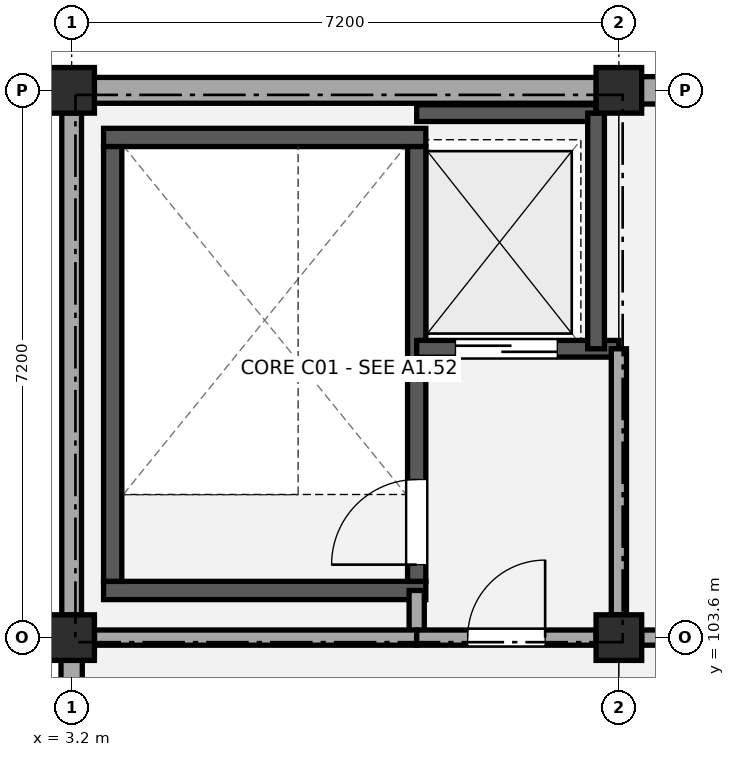
"""IFC4 building model, lengths in metres.
Left out: names, types, materials, properties, quantities, classifications, styles, units other than length and angle.
Written with IfcOpenShell. Run it as: python <this file> out.ifc"""

import sys

from ifc_helpers import new_model, si_unit, direction, frame, frame_2d, origin, origin_2d, place, context, subcontext, project, spatial, rectangle, extrude, element, fill, save


model = new_model("IFC4")
c1 = context("Model", 3, precision=1e-05, world=origin(), true_north=direction((0.0, 1.0)))
c2 = subcontext(c1, "Body", "Model", "MODEL_VIEW")
j1 = project(units=[si_unit("LENGTHUNIT", "METRE"), si_unit("PLANEANGLEUNIT", "RADIAN")], contexts=[c1])
p1 = place(None, origin())
s1 = spatial("IfcSite", under=j1, at=p1, CompositionType="ELEMENT")
p2 = place(p1, origin())
s2 = spatial("IfcBuilding", under=s1, at=p2, CompositionType="ELEMENT")
p3 = place(p2, frame((0.0, 0.0, 9.18)))
s3 = spatial("IfcBuildingStorey", under=s2, at=p3, CompositionType="ELEMENT", Elevation=9.18)
for number, where, z_axis, x_axis in (
    (1, (3.2, 103.6, 0.0), (0.0, 0.0, 1.0), (1.0, 0.0, 0.0)),
    (2, (3.2, 110.8, 0.0), (0.0, 0.0, 1.0), (1.0, 0.0, 0.0)),
    (3, (10.4, 103.6, 0.0), (0.0, 0.0, 1.0), (1.0, 0.0, 0.0)),
    (4, (10.4, 110.8, 0.0), (0.0, 0.0, 1.0), (1.0, 0.0, 0.0)),
):
    element("IfcColumn", number, at=place(p3, frame(where, z_axis=z_axis, x_axis=x_axis)), inside=s3, PredefinedType="COLUMN", context=c2, shape_type="SweptSolid", body=[
        extrude(rectangle(XDim=0.6, YDim=0.6, at=origin_2d()), origin(), (0.0, 0.0, 1.0), 4.32),
    ])
p4 = place(p3, frame((3.495, 110.8, 0.0), z_axis=(0.0, 0.0, 1.0), x_axis=(1.0, 0.0, 0.0)))
e5 = element("IfcWall", 5, at=p4, inside=s3, PredefinedType="STANDARD", context=c2, shape_type="SweptSolid", body=[
    extrude(rectangle(XDim=6.61, YDim=0.34, at=frame_2d((3.305, 0.0))), origin(), (0.0, 0.0, 1.0), 3.48),
])
p5 = place(p3, frame((10.695, 110.8, 0.0), z_axis=(0.0, 0.0, 1.0), x_axis=(1.0, 0.0, 0.0)))
e6 = element("IfcWall", 6, at=p5, inside=s3, PredefinedType="STANDARD", context=c2, shape_type="SweptSolid", body=[
    extrude(rectangle(XDim=6.61, YDim=0.36, at=frame_2d((3.305, 0.0))), origin(), (0.0, 0.0, 1.0), 3.48),
])
p6 = place(p3, frame((3.2, 96.695, 0.0), z_axis=(0.0, 0.0, 1.0), x_axis=(0.0, 1.0, 0.0)))
e7 = element("IfcWall", 7, at=p6, inside=s3, PredefinedType="STANDARD", context=c2, shape_type="SweptSolid", body=[
    extrude(rectangle(XDim=6.61, YDim=0.28, at=frame_2d((3.305, 0.0))), origin(), (0.0, 0.0, 1.0), 3.48),
])
p7 = place(p3, frame((3.2, 103.895, 0.0), z_axis=(0.0, 0.0, 1.0), x_axis=(0.0, 1.0, 0.0)))
e8 = element("IfcWall", 8, at=p7, inside=s3, PredefinedType="STANDARD", context=c2, shape_type="SweptSolid", body=[
    extrude(rectangle(XDim=6.61, YDim=0.26, at=frame_2d((3.305, 0.0))), origin(), (0.0, 0.0, 1.0), 3.48),
])
for number, where, z_axis, x_axis in (
    (9, (3.62, 104.22, 0.0), (0.0, 0.0, 1.0), (1.0, 0.0, 0.0)),
    (10, (3.62, 110.18, 0.0), (0.0, 0.0, 1.0), (1.0, 0.0, 0.0)),
):
    element("IfcWall", number, at=place(p3, frame(where, z_axis=z_axis, x_axis=x_axis)), inside=s3, PredefinedType="SHEAR", context=c2, shape_type="SweptSolid", body=[
        extrude(rectangle(XDim=4.24, YDim=0.24, at=frame_2d((2.12, 0.0))), origin(), (0.0, 0.0, 1.0), 4.04),
    ])
p8 = place(p3, frame((3.74, 104.34, 0.0), z_axis=(0.0, 0.0, 1.0), x_axis=(0.0, 1.0, 0.0)))
e11 = element("IfcWall", 11, at=p8, inside=s3, PredefinedType="SHEAR", context=c2, shape_type="SweptSolid", body=[
    extrude(rectangle(XDim=5.72, YDim=0.24, at=frame_2d((2.86, 0.0))), origin(), (0.0, 0.0, 1.0), 4.04),
])
p9 = place(p3, frame((7.74, 104.34, 0.0), z_axis=(0.0, 0.0, 1.0), x_axis=(0.0, 1.0, 0.0)))
e12 = element("IfcWall", 12, at=p9, inside=s3, PredefinedType="SHEAR", context=c2, shape_type="SweptSolid", body=[
    extrude(rectangle(XDim=5.72, YDim=0.24, at=frame_2d((2.86, 0.0))), origin(), (0.0, 0.0, 1.0), 4.04),
])
p10 = place(p9, frame((0.22, 0.0, 0.0)))
e13 = element("IfcOpeningElement", 13, at=p10, cuts=e12, PredefinedType="OPENING", context=c2, shape_type="SweptSolid", body=[
    extrude(rectangle(XDim=1.12, YDim=2.15, at=frame_2d((0.56, 1.075))), frame((0.0, 0.13, 0.0), z_axis=(0.0, -1.0, 0.0), x_axis=(1.0, 0.0, 0.0)), (0.0, 0.0, 1.0), 0.26),
])
p11 = place(p3, frame((7.74, 107.4, 0.0), z_axis=(0.0, 0.0, 1.0), x_axis=(1.0, 0.0, 0.0)))
e14 = element("IfcWall", 14, at=p11, inside=s3, PredefinedType="SHEAR", context=c2, shape_type="SweptSolid", body=[
    extrude(rectangle(XDim=2.66, YDim=0.22, at=frame_2d((1.33, 0.0))), origin(), (0.0, 0.0, 1.0), 4.04),
])
p12 = place(p11, frame((0.51, 0.0, 0.0)))
e15 = element("IfcOpeningElement", 15, at=p12, cuts=e14, PredefinedType="OPENING", context=c2, shape_type="SweptSolid", body=[
    extrude(rectangle(XDim=1.34, YDim=2.15, at=frame_2d((0.67, 1.075))), frame((0.0, 0.12, 0.0), z_axis=(0.0, -1.0, 0.0), x_axis=(1.0, 0.0, 0.0)), (0.0, 0.0, 1.0), 0.24),
])
p13 = place(p3, frame((7.74, 110.5, 0.0), z_axis=(0.0, 0.0, 1.0), x_axis=(1.0, 0.0, 0.0)))
e16 = element("IfcWall", 16, at=p13, inside=s3, PredefinedType="SHEAR", context=c2, shape_type="SweptSolid", body=[
    extrude(rectangle(XDim=2.36, YDim=0.22, at=frame_2d((1.18, 0.0))), origin(), (0.0, 0.0, 1.0), 4.04),
])
p14 = place(p3, frame((10.1, 107.4, 0.0), z_axis=(0.0, 0.0, 1.0), x_axis=(0.0, 1.0, 0.0)))
e17 = element("IfcWall", 17, at=p14, inside=s3, PredefinedType="SHEAR", context=c2, shape_type="SweptSolid", body=[
    extrude(rectangle(XDim=3.1, YDim=0.22, at=frame_2d((1.55, 0.0))), origin(), (0.0, 0.0, 1.0), 4.04),
])
p15 = place(p3, frame((7.74, 103.6, 0.0), z_axis=(0.0, 0.0, 1.0), x_axis=(0.0, 1.0, 0.0)))
e18 = element("IfcWall", 18, at=p15, inside=s3, PredefinedType="PARTITIONING", context=c2, shape_type="SweptSolid", body=[
    extrude(rectangle(XDim=0.62, YDim=0.2, at=frame_2d((0.31, 0.0))), origin(), (0.0, 0.0, 1.0), 3.38),
])
p16 = place(p3, frame((10.4, 103.9, 0.0), z_axis=(0.0, 0.0, 1.0), x_axis=(0.0, 1.0, 0.0)))
e19 = element("IfcWall", 19, at=p16, inside=s3, PredefinedType="PARTITIONING", context=c2, shape_type="SweptSolid", body=[
    extrude(rectangle(XDim=3.5, YDim=0.2, at=frame_2d((1.75, 0.0))), origin(), (0.0, 0.0, 1.0), 3.38),
])
p17 = place(p3, frame((3.5, 103.6, 0.0), z_axis=(0.0, 0.0, 1.0), x_axis=(1.0, 0.0, 0.0)))
e20 = element("IfcWall", 20, at=p17, inside=s3, PredefinedType="PARTITIONING", context=c2, shape_type="SweptSolid", body=[
    extrude(rectangle(XDim=4.24, YDim=0.2, at=frame_2d((2.12, 0.0))), origin(), (0.0, 0.0, 1.0), 3.38),
])
p18 = place(p3, frame((7.74, 103.6, 0.0), z_axis=(0.0, 0.0, 1.0), x_axis=(1.0, 0.0, 0.0)))
e21 = element("IfcWall", 21, at=p18, inside=s3, PredefinedType="PARTITIONING", context=c2, shape_type="SweptSolid", body=[
    extrude(rectangle(XDim=2.36, YDim=0.2, at=frame_2d((1.18, 0.0))), origin(), (0.0, 0.0, 1.0), 3.38),
])
p19 = place(p18, frame((0.67, 0.0, 0.0)))
e22 = element("IfcOpeningElement", 22, at=p19, cuts=e21, PredefinedType="OPENING", context=c2, shape_type="SweptSolid", body=[
    extrude(rectangle(XDim=1.02, YDim=2.15, at=frame_2d((0.51, 1.075))), frame((0.0, 0.11, 0.0), z_axis=(0.0, -1.0, 0.0), x_axis=(1.0, 0.0, 0.0)), (0.0, 0.0, 1.0), 0.22),
])
p20 = place(p3, frame((10.7, 103.6, 0.0), z_axis=(0.0, 0.0, 1.0), x_axis=(1.0, 0.0, 0.0)))
e23 = element("IfcWall", 23, at=p20, inside=s3, PredefinedType="PARTITIONING", context=c2, shape_type="SweptSolid", body=[
    extrude(rectangle(XDim=6.6, YDim=0.2, at=frame_2d((3.3, 0.0))), origin(), (0.0, 0.0, 1.0), 3.43),
])
p21 = place(p20, frame((2.69, 0.0, 0.0)))
e24 = element("IfcOpeningElement", 24, at=p21, cuts=e23, PredefinedType="OPENING", context=c2, shape_type="SweptSolid", body=[
    extrude(rectangle(XDim=1.22, YDim=2.16, at=frame_2d((0.61, 1.08))), frame((0.0, 0.11, 0.0), z_axis=(0.0, -1.0, 0.0), x_axis=(1.0, 0.0, 0.0)), (0.0, 0.0, 1.0), 0.22),
])
p22 = place(p10, origin())
e25 = element("IfcDoor", 25, at=p22, inside=s3, OperationType="SINGLE_SWING_LEFT", PredefinedType="DOOR", context=c2, shape_type="SweptSolid", body=[
    extrude(rectangle(XDim=1.12, YDim=2.15, at=frame_2d((0.56, 1.075))), frame((0.0, 0.025, 0.0), z_axis=(0.0, -1.0, 0.0), x_axis=(1.0, 0.0, 0.0)), (0.0, 0.0, 1.0), 0.05),
])
fill(e13, e25)
p23 = place(p12, origin())
e26 = element("IfcDoor", 26, at=p23, inside=s3, OperationType="DOUBLE_DOOR_SLIDING", PredefinedType="DOOR", context=c2, shape_type="SweptSolid", body=[
    extrude(rectangle(XDim=1.34, YDim=2.15, at=frame_2d((0.67, 1.075))), frame((0.0, 0.025, 0.0), z_axis=(0.0, -1.0, 0.0), x_axis=(1.0, 0.0, 0.0)), (0.0, 0.0, 1.0), 0.05),
])
fill(e15, e26)
p24 = place(p19, origin())
e27 = element("IfcDoor", 27, at=p24, inside=s3, OperationType="SINGLE_SWING_RIGHT", PredefinedType="DOOR", context=c2, shape_type="SweptSolid", body=[
    extrude(rectangle(XDim=1.02, YDim=2.15, at=frame_2d((0.51, 1.075))), frame((0.0, 0.025, 0.0), z_axis=(0.0, -1.0, 0.0), x_axis=(1.0, 0.0, 0.0)), (0.0, 0.0, 1.0), 0.05),
])
fill(e22, e27)
save(model, sys.argv[1])
